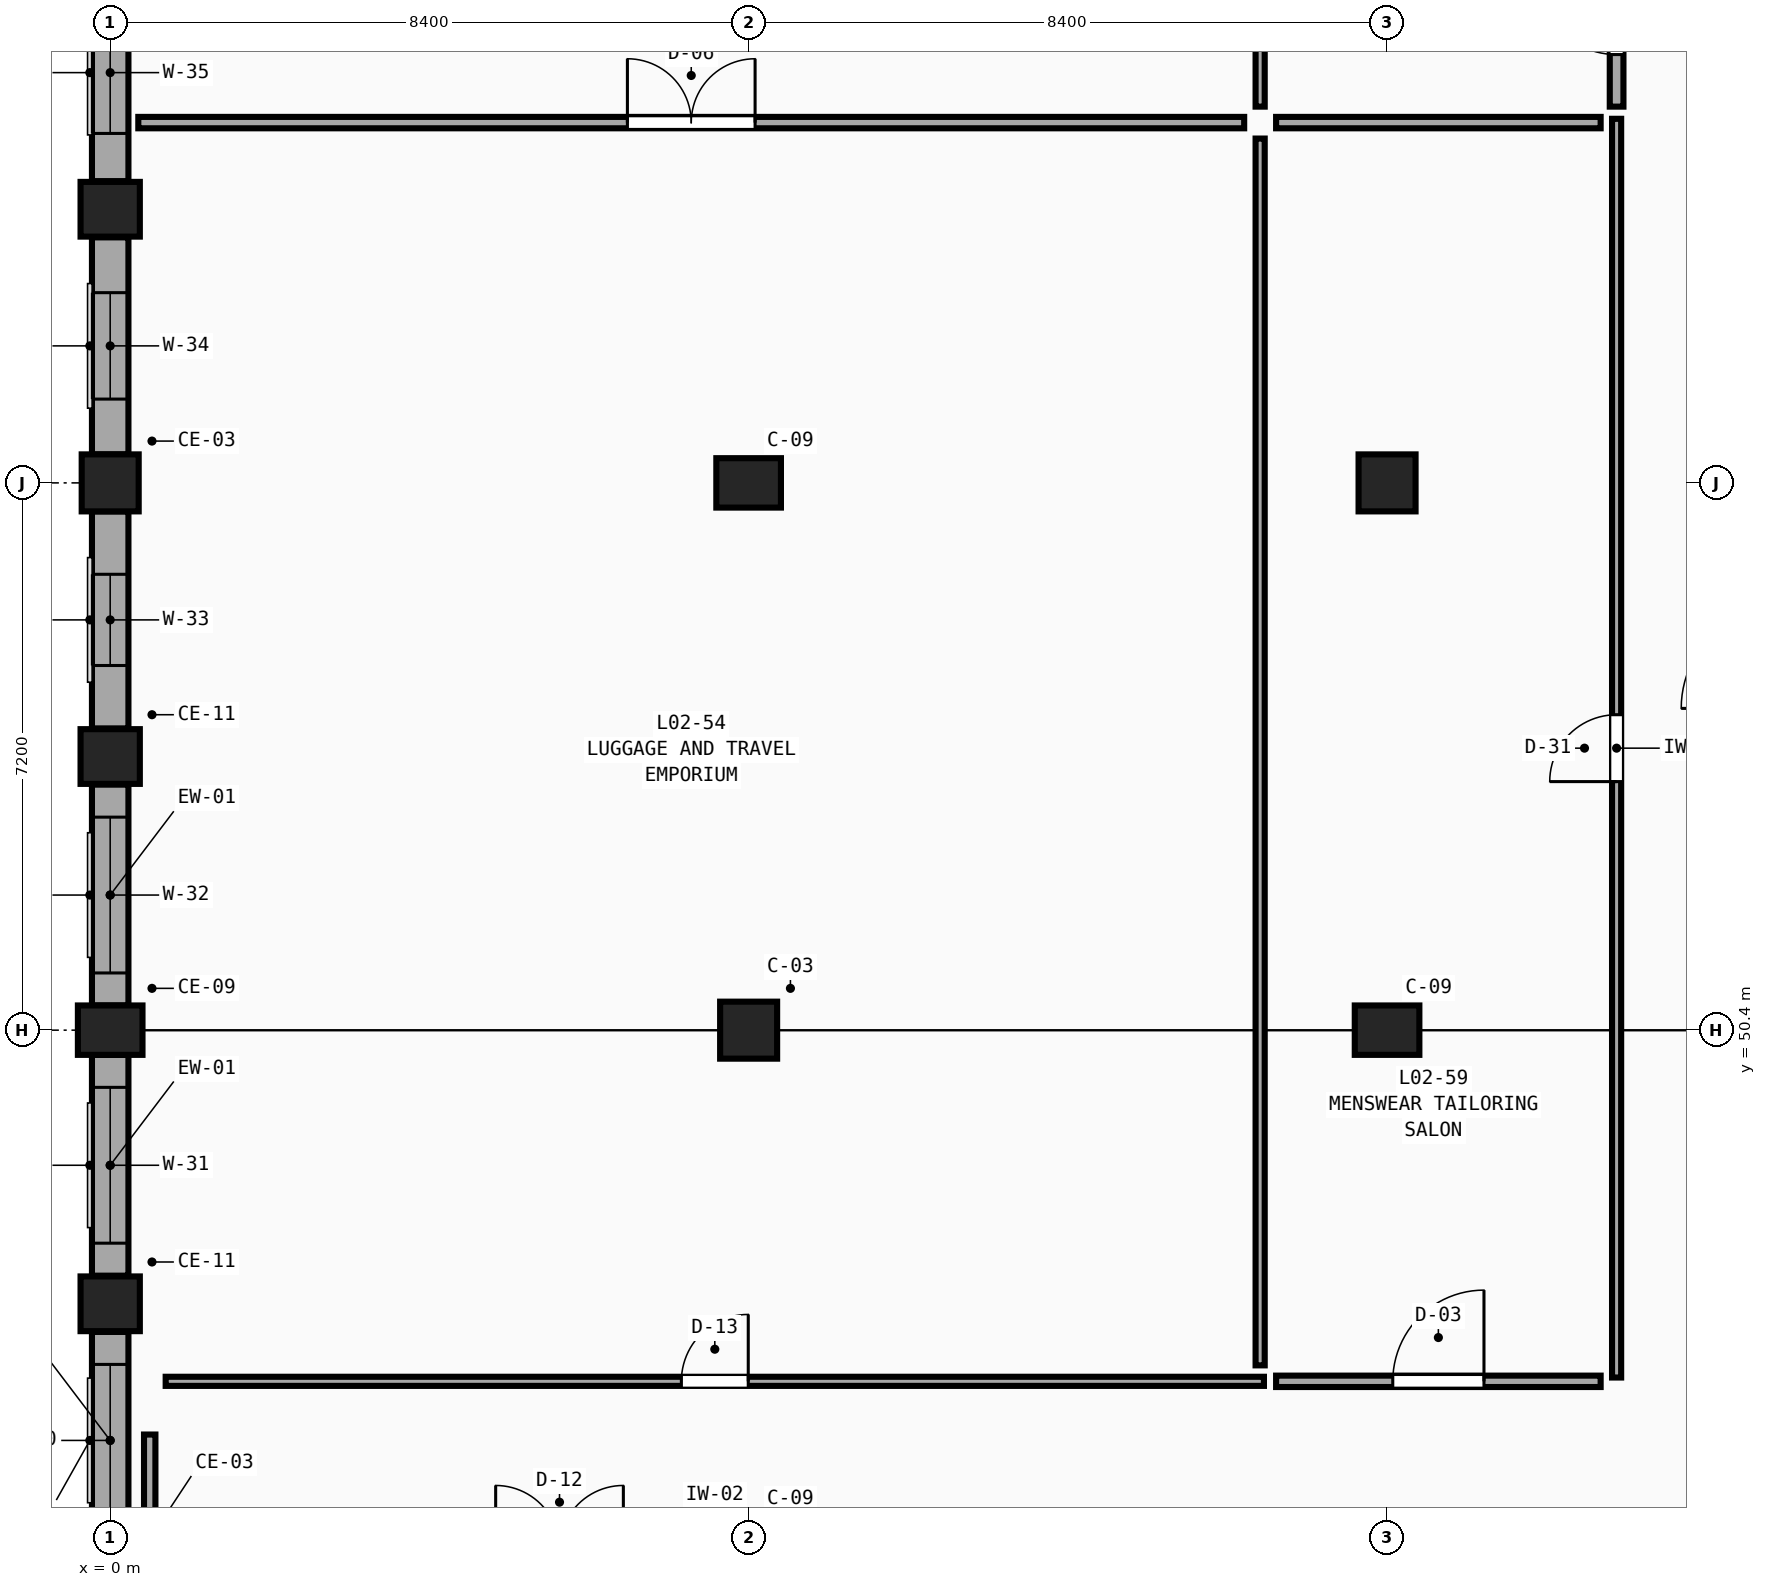
"""IFC4 building model, lengths in metres.
Left out: names, types, materials, properties, quantities, classifications, styles, units other than length and angle.
Written with IfcOpenShell. Run it as: python <this file> out.ifc"""

import sys

from ifc_helpers import new_model, si_unit, direction, frame, frame_2d, origin, origin_2d, place, context, subcontext, project, spatial, rectangle, extrude, element, fill, save


model = new_model("IFC4")
c1 = context("Model", 3, precision=1e-05, world=origin(), true_north=direction((0.0, 1.0)))
c2 = subcontext(c1, "Body", "Model", "MODEL_VIEW")
j1 = project(units=[si_unit("LENGTHUNIT", "METRE"), si_unit("PLANEANGLEUNIT", "RADIAN")], contexts=[c1])
p1 = place(None, origin())
s1 = spatial("IfcSite", under=j1, at=p1, CompositionType="ELEMENT")
p2 = place(p1, origin())
s2 = spatial("IfcBuilding", under=s1, at=p2, CompositionType="ELEMENT")
p3 = place(p2, frame((0.0, 0.0, 9.9)))
s3 = spatial("IfcBuildingStorey", under=s2, at=p3, CompositionType="ELEMENT", Elevation=9.9)
p4 = place(p3, frame((0.0, 50.4, 0.0), z_axis=(0.0, 0.0, 1.0), x_axis=(1.0, 0.0, 0.0)))
e1 = element("IfcColumn", 1, at=p4, inside=s3, PredefinedType="COLUMN", context=c2, shape_type="SweptSolid", body=[
    extrude(rectangle(XDim=0.85, YDim=0.65, at=origin_2d()), origin(), (0.0, 0.0, 1.0), 4.5),
])
for number, where, z_axis, x_axis in (
    (2, (0.0, 57.6, 0.0), (0.0, 0.0, 1.0), (1.0, 0.0, 0.0)),
    (3, (8.4, 50.4, 0.0), (0.0, 0.0, 1.0), (1.0, 0.0, 0.0)),
):
    element("IfcColumn", number, at=place(p3, frame(where, z_axis=z_axis, x_axis=x_axis)), inside=s3, PredefinedType="COLUMN", context=c2, shape_type="SweptSolid", body=[
        extrude(rectangle(XDim=0.75, YDim=0.75, at=origin_2d()), origin(), (0.0, 0.0, 1.0), 4.5),
    ])
for number, where, z_axis, x_axis in (
    (4, (8.4, 57.6, 0.0), (0.0, 0.0, 1.0), (1.0, 0.0, 0.0)),
    (5, (16.8, 50.4, 0.0), (0.0, 0.0, 1.0), (1.0, 0.0, 0.0)),
):
    element("IfcColumn", number, at=place(p3, frame(where, z_axis=z_axis, x_axis=x_axis)), inside=s3, PredefinedType="COLUMN", context=c2, shape_type="SweptSolid", body=[
        extrude(rectangle(XDim=0.85, YDim=0.65, at=origin_2d()), origin(), (0.0, 0.0, 1.0), 4.5),
    ])
p5 = place(p3, frame((16.8, 57.6, 0.0), z_axis=(0.0, 0.0, 1.0), x_axis=(1.0, 0.0, 0.0)))
e6 = element("IfcColumn", 6, at=p5, inside=s3, PredefinedType="COLUMN", context=c2, shape_type="SweptSolid", body=[
    extrude(rectangle(XDim=0.75, YDim=0.75, at=origin_2d()), origin(), (0.0, 0.0, 1.0), 4.5),
])
for number, where, z_axis, x_axis in (
    (7, (0.0, 46.8, 0.0), (0.0, 0.0, 1.0), (1.0, 0.0, 0.0)),
    (8, (0.0, 54.0, 0.0), (0.0, 0.0, 1.0), (1.0, 0.0, 0.0)),
    (9, (0.0, 61.2, 0.0), (0.0, 0.0, 1.0), (1.0, 0.0, 0.0)),
):
    element("IfcColumn", number, at=place(p3, frame(where, z_axis=z_axis, x_axis=x_axis)), inside=s3, PredefinedType="PILASTER", context=c2, shape_type="SweptSolid", body=[
        extrude(rectangle(XDim=0.78, YDim=0.72, at=origin_2d()), origin(), (0.0, 0.0, 1.0), 4.5),
    ])
p6 = place(p3, frame((0.0, 43.575, 0.0), z_axis=(0.0, 0.0, 1.0), x_axis=(0.0, 1.0, 0.0)))
e10 = element("IfcWall", 10, at=p6, inside=s3, PredefinedType="SOLIDWALL", context=c2, shape_type="SweptSolid", body=[
    extrude(rectangle(XDim=2.855, YDim=0.48, at=frame_2d((1.427, 0.0))), origin(), (0.0, 0.0, 1.0), 3.63),
])
p7 = place(p6, frame((0.427, 0.0, 0.75)))
e11 = element("IfcOpeningElement", 11, at=p7, cuts=e10, PredefinedType="OPENING", context=c2, shape_type="SweptSolid", body=[
    extrude(rectangle(XDim=2.0, YDim=2.44, at=frame_2d((1.0, 1.22))), frame((0.0, 0.26, 0.0), z_axis=(0.0, -1.0, 0.0), x_axis=(1.0, 0.0, 0.0)), (0.0, 0.0, 1.0), 0.52),
])
p8 = place(p3, frame((0.0, 47.17, 0.0), z_axis=(0.0, 0.0, 1.0), x_axis=(0.0, 1.0, 0.0)))
e12 = element("IfcWall", 12, at=p8, inside=s3, PredefinedType="SOLIDWALL", context=c2, shape_type="SweptSolid", body=[
    extrude(rectangle(XDim=2.905, YDim=0.48, at=frame_2d((1.453, 0.0))), origin(), (0.0, 0.0, 1.0), 3.63),
])
p9 = place(p8, frame((0.427, 0.0, 0.75)))
e13 = element("IfcOpeningElement", 13, at=p9, cuts=e12, PredefinedType="OPENING", context=c2, shape_type="SweptSolid", body=[
    extrude(rectangle(XDim=2.05, YDim=2.44, at=frame_2d((1.025, 1.22))), frame((0.0, 0.26, 0.0), z_axis=(0.0, -1.0, 0.0), x_axis=(1.0, 0.0, 0.0)), (0.0, 0.0, 1.0), 0.52),
])
p10 = place(p3, frame((0.0, 50.725, 0.0), z_axis=(0.0, 0.0, 1.0), x_axis=(0.0, 1.0, 0.0)))
e14 = element("IfcWall", 14, at=p10, inside=s3, PredefinedType="SOLIDWALL", context=c2, shape_type="SweptSolid", body=[
    extrude(rectangle(XDim=2.905, YDim=0.48, at=frame_2d((1.452, 0.0))), origin(), (0.0, 0.0, 1.0), 3.63),
])
p11 = place(p10, frame((0.427, 0.0, 0.75)))
e15 = element("IfcOpeningElement", 15, at=p11, cuts=e14, PredefinedType="OPENING", context=c2, shape_type="SweptSolid", body=[
    extrude(rectangle(XDim=2.05, YDim=2.44, at=frame_2d((1.025, 1.22))), frame((0.0, 0.26, 0.0), z_axis=(0.0, -1.0, 0.0), x_axis=(1.0, 0.0, 0.0)), (0.0, 0.0, 1.0), 0.52),
])
p12 = place(p3, frame((0.0, 54.37, 0.0), z_axis=(0.0, 0.0, 1.0), x_axis=(0.0, 1.0, 0.0)))
e16 = element("IfcWall", 16, at=p12, inside=s3, PredefinedType="SOLIDWALL", context=c2, shape_type="SweptSolid", body=[
    extrude(rectangle(XDim=2.855, YDim=0.48, at=frame_2d((1.427, 0.0))), origin(), (0.0, 0.0, 1.0), 3.63),
])
p13 = place(p12, frame((0.827, 0.0, 0.75)))
e17 = element("IfcOpeningElement", 17, at=p13, cuts=e16, PredefinedType="OPENING", context=c2, shape_type="SweptSolid", body=[
    extrude(rectangle(XDim=1.2, YDim=2.62, at=frame_2d((0.6, 1.31))), frame((0.0, 0.26, 0.0), z_axis=(0.0, -1.0, 0.0), x_axis=(1.0, 0.0, 0.0)), (0.0, 0.0, 1.0), 0.52),
])
p14 = place(p3, frame((0.0, 57.975, 0.0), z_axis=(0.0, 0.0, 1.0), x_axis=(0.0, 1.0, 0.0)))
e18 = element("IfcWall", 18, at=p14, inside=s3, PredefinedType="SOLIDWALL", context=c2, shape_type="SweptSolid", body=[
    extrude(rectangle(XDim=2.855, YDim=0.48, at=frame_2d((1.427, 0.0))), origin(), (0.0, 0.0, 1.0), 3.63),
])
p15 = place(p14, frame((0.728, 0.0, 0.75)))
e19 = element("IfcOpeningElement", 19, at=p15, cuts=e18, PredefinedType="OPENING", context=c2, shape_type="SweptSolid", body=[
    extrude(rectangle(XDim=1.4, YDim=2.62, at=frame_2d((0.7, 1.31))), frame((0.0, 0.26, 0.0), z_axis=(0.0, -1.0, 0.0), x_axis=(1.0, 0.0, 0.0)), (0.0, 0.0, 1.0), 0.52),
])
p16 = place(p3, frame((0.0, 61.57, 0.0), z_axis=(0.0, 0.0, 1.0), x_axis=(0.0, 1.0, 0.0)))
e20 = element("IfcWall", 20, at=p16, inside=s3, PredefinedType="SOLIDWALL", context=c2, shape_type="SweptSolid", body=[
    extrude(rectangle(XDim=2.855, YDim=0.48, at=frame_2d((1.427, 0.0))), origin(), (0.0, 0.0, 1.0), 3.63),
])
p17 = place(p16, frame((0.627, 0.0, 0.75)))
e21 = element("IfcOpeningElement", 21, at=p17, cuts=e20, PredefinedType="OPENING", context=c2, shape_type="SweptSolid", body=[
    extrude(rectangle(XDim=1.6, YDim=2.62, at=frame_2d((0.8, 1.31))), frame((0.0, 0.26, 0.0), z_axis=(0.0, -1.0, 0.0), x_axis=(1.0, 0.0, 0.0)), (0.0, 0.0, 1.0), 0.52),
])
p18 = place(p3, frame((19.82, 45.83, 0.0), z_axis=(0.0, 0.0, 1.0), x_axis=(0.0, 1.0, 0.0)))
e22 = element("IfcWall", 22, at=p18, inside=s3, PredefinedType="PARTITIONING", context=c2, shape_type="SweptSolid", body=[
    extrude(rectangle(XDim=16.56, YDim=0.12, at=frame_2d((8.28, 0.0))), origin(), (0.0, 0.0, 1.0), 4.18),
])
p19 = place(p18, frame((7.84, 0.0, 0.0)))
e23 = element("IfcOpeningElement", 23, at=p19, cuts=e22, PredefinedType="OPENING", context=c2, shape_type="SweptSolid", body=[
    extrude(rectangle(XDim=0.88, YDim=2.45, at=frame_2d((0.44, 1.225))), frame((0.0, 0.08, 0.0), z_axis=(0.0, -1.0, 0.0), x_axis=(1.0, 0.0, 0.0)), (0.0, 0.0, 1.0), 0.16),
])
p20 = place(p3, frame((0.73, 45.78, 0.0), z_axis=(0.0, 0.0, 1.0), x_axis=(1.0, 0.0, 0.0)))
e24 = element("IfcWall", 24, at=p20, inside=s3, PredefinedType="PARTITIONING", context=c2, shape_type="SweptSolid", body=[
    extrude(rectangle(XDim=14.45, YDim=0.12, at=frame_2d((7.225, 0.0))), origin(), (0.0, 0.0, 1.0), 4.18),
])
p21 = place(p20, frame((6.785, 0.0, 0.0)))
e25 = element("IfcOpeningElement", 25, at=p21, cuts=e24, PredefinedType="OPENING", context=c2, shape_type="SweptSolid", body=[
    extrude(rectangle(XDim=0.88, YDim=2.21, at=frame_2d((0.44, 1.105))), frame((0.0, 0.08, 0.0), z_axis=(0.0, -1.0, 0.0), x_axis=(1.0, 0.0, 0.0)), (0.0, 0.0, 1.0), 0.16),
])
p22 = place(p3, frame((15.34, 45.78, 0.0), z_axis=(0.0, 0.0, 1.0), x_axis=(1.0, 0.0, 0.0)))
e26 = element("IfcWall", 26, at=p22, inside=s3, PredefinedType="PARTITIONING", context=c2, shape_type="SweptSolid", body=[
    extrude(rectangle(XDim=4.27, YDim=0.15, at=frame_2d((2.135, 0.0))), origin(), (0.0, 0.0, 1.0), 4.18),
])
p23 = place(p22, frame((1.535, 0.0, 0.0)))
e27 = element("IfcOpeningElement", 27, at=p23, cuts=e26, PredefinedType="OPENING", context=c2, shape_type="SweptSolid", body=[
    extrude(rectangle(XDim=1.2, YDim=2.05, at=frame_2d((0.6, 1.025))), frame((0.0, 0.095, 0.0), z_axis=(0.0, -1.0, 0.0), x_axis=(1.0, 0.0, 0.0)), (0.0, 0.0, 1.0), 0.19),
])
p24 = place(p3, frame((19.82, 62.55, 0.0), z_axis=(0.0, 0.0, 1.0), x_axis=(0.0, 1.0, 0.0)))
e28 = element("IfcWall", 28, at=p24, inside=s3, PredefinedType="PARTITIONING", context=c2, shape_type="SweptSolid", body=[
    extrude(rectangle(XDim=2.41, YDim=0.18, at=frame_2d((1.205, 0.0))), origin(), (0.0, 0.0, 1.0), 4.18),
])
p25 = place(p24, frame((0.685, 0.0, 0.0)))
e29 = element("IfcOpeningElement", 29, at=p25, cuts=e28, PredefinedType="OPENING", context=c2, shape_type="SweptSolid", body=[
    extrude(rectangle(XDim=1.04, YDim=2.37, at=frame_2d((0.52, 1.185))), frame((0.0, 0.11, 0.0), z_axis=(0.0, -1.0, 0.0), x_axis=(1.0, 0.0, 0.0)), (0.0, 0.0, 1.0), 0.22),
])
p26 = place(p3, frame((0.52, 43.78, 0.0), z_axis=(0.0, 0.0, 1.0), x_axis=(0.0, 1.0, 0.0)))
e30 = element("IfcWall", 30, at=p26, inside=s3, PredefinedType="PARTITIONING", context=c2, shape_type="SweptSolid", body=[
    extrude(rectangle(XDim=1.3, YDim=0.15, at=frame_2d((0.65, 0.0))), origin(), (0.0, 0.0, 1.0), 3.63),
])
p27 = place(p3, frame((15.13, 45.99, 0.0), z_axis=(0.0, 0.0, 1.0), x_axis=(0.0, 1.0, 0.0)))
e31 = element("IfcWall", 31, at=p27, inside=s3, PredefinedType="PARTITIONING", context=c2, shape_type="SweptSolid", body=[
    extrude(rectangle(XDim=16.14, YDim=0.12, at=frame_2d((8.07, 0.0))), origin(), (0.0, 0.0, 1.0), 4.18),
])
p28 = place(p3, frame((0.37, 62.34, 0.0), z_axis=(0.0, 0.0, 1.0), x_axis=(1.0, 0.0, 0.0)))
e32 = element("IfcWall", 32, at=p28, inside=s3, PredefinedType="PARTITIONING", context=c2, shape_type="SweptSolid", body=[
    extrude(rectangle(XDim=14.55, YDim=0.15, at=frame_2d((7.275, 0.0))), origin(), (0.0, 0.0, 1.0), 4.18),
])
p29 = place(p28, frame((6.435, 0.0, 0.0)))
e33 = element("IfcOpeningElement", 33, at=p29, cuts=e32, PredefinedType="OPENING", context=c2, shape_type="SweptSolid", body=[
    extrude(rectangle(XDim=1.68, YDim=2.05, at=frame_2d((0.84, 1.025))), frame((0.0, 0.095, 0.0), z_axis=(0.0, -1.0, 0.0), x_axis=(1.0, 0.0, 0.0)), (0.0, 0.0, 1.0), 0.19),
])
p30 = place(p3, frame((15.13, 62.55, 0.0), z_axis=(0.0, 0.0, 1.0), x_axis=(0.0, 1.0, 0.0)))
e34 = element("IfcWall", 34, at=p30, inside=s3, PredefinedType="PARTITIONING", context=c2, shape_type="SweptSolid", body=[
    extrude(rectangle(XDim=12.663, YDim=0.12, at=frame_2d((6.332, 0.0))), origin(), (0.0, 0.0, 1.0), 4.18),
])
p31 = place(p3, frame((15.34, 62.34, 0.0), z_axis=(0.0, 0.0, 1.0), x_axis=(1.0, 0.0, 0.0)))
e35 = element("IfcWall", 35, at=p31, inside=s3, PredefinedType="PARTITIONING", context=c2, shape_type="SweptSolid", body=[
    extrude(rectangle(XDim=4.27, YDim=0.15, at=frame_2d((2.135, 0.0))), origin(), (0.0, 0.0, 1.0), 4.18),
])
p32 = place(p7, origin())
e36 = element("IfcWindow", 36, at=p32, inside=s3, PartitioningType="TRIPLE_PANEL_VERTICAL", PredefinedType="WINDOW", context=c2, shape_type="SweptSolid", body=[
    extrude(rectangle(XDim=2.0, YDim=2.44, at=frame_2d((1.0, 1.22))), frame((0.0, 0.03, 0.0), z_axis=(0.0, -1.0, 0.0), x_axis=(1.0, 0.0, 0.0)), (0.0, 0.0, 1.0), 0.06),
])
fill(e11, e36)
p33 = place(p9, origin())
e37 = element("IfcWindow", 37, at=p33, inside=s3, PartitioningType="TRIPLE_PANEL_VERTICAL", PredefinedType="WINDOW", context=c2, shape_type="SweptSolid", body=[
    extrude(rectangle(XDim=2.05, YDim=2.44, at=frame_2d((1.025, 1.22))), frame((0.0, 0.03, 0.0), z_axis=(0.0, -1.0, 0.0), x_axis=(1.0, 0.0, 0.0)), (0.0, 0.0, 1.0), 0.06),
])
fill(e13, e37)
p34 = place(p11, origin())
e38 = element("IfcWindow", 38, at=p34, inside=s3, PartitioningType="TRIPLE_PANEL_VERTICAL", PredefinedType="WINDOW", context=c2, shape_type="SweptSolid", body=[
    extrude(rectangle(XDim=2.05, YDim=2.44, at=frame_2d((1.025, 1.22))), frame((0.0, 0.03, 0.0), z_axis=(0.0, -1.0, 0.0), x_axis=(1.0, 0.0, 0.0)), (0.0, 0.0, 1.0), 0.06),
])
fill(e15, e38)
p35 = place(p13, origin())
e39 = element("IfcWindow", 39, at=p35, inside=s3, PartitioningType="SINGLE_PANEL", PredefinedType="WINDOW", context=c2, shape_type="SweptSolid", body=[
    extrude(rectangle(XDim=1.2, YDim=2.62, at=frame_2d((0.6, 1.31))), frame((0.0, 0.03, 0.0), z_axis=(0.0, -1.0, 0.0), x_axis=(1.0, 0.0, 0.0)), (0.0, 0.0, 1.0), 0.06),
])
fill(e17, e39)
p36 = place(p15, origin())
e40 = element("IfcWindow", 40, at=p36, inside=s3, PartitioningType="DOUBLE_PANEL_VERTICAL", PredefinedType="WINDOW", context=c2, shape_type="SweptSolid", body=[
    extrude(rectangle(XDim=1.4, YDim=2.62, at=frame_2d((0.7, 1.31))), frame((0.0, 0.03, 0.0), z_axis=(0.0, -1.0, 0.0), x_axis=(1.0, 0.0, 0.0)), (0.0, 0.0, 1.0), 0.06),
])
fill(e19, e40)
p37 = place(p17, origin())
e41 = element("IfcWindow", 41, at=p37, inside=s3, PartitioningType="DOUBLE_PANEL_VERTICAL", PredefinedType="WINDOW", context=c2, shape_type="SweptSolid", body=[
    extrude(rectangle(XDim=1.6, YDim=2.62, at=frame_2d((0.8, 1.31))), frame((0.0, 0.03, 0.0), z_axis=(0.0, -1.0, 0.0), x_axis=(1.0, 0.0, 0.0)), (0.0, 0.0, 1.0), 0.06),
])
fill(e21, e41)
p38 = place(p19, origin())
e42 = element("IfcDoor", 42, at=p38, inside=s3, OperationType="SINGLE_SWING_LEFT", PredefinedType="DOOR", context=c2, shape_type="SweptSolid", body=[
    extrude(rectangle(XDim=0.88, YDim=2.45, at=frame_2d((0.44, 1.225))), frame((0.0, 0.025, 0.0), z_axis=(0.0, -1.0, 0.0), x_axis=(1.0, 0.0, 0.0)), (0.0, 0.0, 1.0), 0.05),
])
fill(e23, e42)
p39 = place(p21, origin())
e43 = element("IfcDoor", 43, at=p39, inside=s3, OperationType="SINGLE_SWING_RIGHT", PredefinedType="DOOR", context=c2, shape_type="SweptSolid", body=[
    extrude(rectangle(XDim=0.88, YDim=2.21, at=frame_2d((0.44, 1.105))), frame((0.0, 0.025, 0.0), z_axis=(0.0, -1.0, 0.0), x_axis=(1.0, 0.0, 0.0)), (0.0, 0.0, 1.0), 0.05),
])
fill(e25, e43)
p40 = place(p23, origin())
e44 = element("IfcDoor", 44, at=p40, inside=s3, OperationType="SINGLE_SWING_RIGHT", PredefinedType="DOOR", context=c2, shape_type="SweptSolid", body=[
    extrude(rectangle(XDim=1.2, YDim=2.05, at=frame_2d((0.6, 1.025))), frame((0.0, 0.025, 0.0), z_axis=(0.0, -1.0, 0.0), x_axis=(1.0, 0.0, 0.0)), (0.0, 0.0, 1.0), 0.05),
])
fill(e27, e44)
p41 = place(p25, origin())
e45 = element("IfcDoor", 45, at=p41, inside=s3, OperationType="SINGLE_SWING_RIGHT", PredefinedType="DOOR", context=c2, shape_type="SweptSolid", body=[
    extrude(rectangle(XDim=1.04, YDim=2.37, at=frame_2d((0.52, 1.185))), frame((0.0, 0.025, 0.0), z_axis=(0.0, -1.0, 0.0), x_axis=(1.0, 0.0, 0.0)), (0.0, 0.0, 1.0), 0.05),
])
fill(e29, e45)
p42 = place(p29, origin())
e46 = element("IfcDoor", 46, at=p42, inside=s3, OperationType="DOUBLE_DOOR_SINGLE_SWING", PredefinedType="DOOR", context=c2, shape_type="SweptSolid", body=[
    extrude(rectangle(XDim=1.68, YDim=2.05, at=frame_2d((0.84, 1.025))), frame((0.0, 0.025, 0.0), z_axis=(0.0, -1.0, 0.0), x_axis=(1.0, 0.0, 0.0)), (0.0, 0.0, 1.0), 0.05),
])
fill(e33, e46)
save(model, sys.argv[1])
